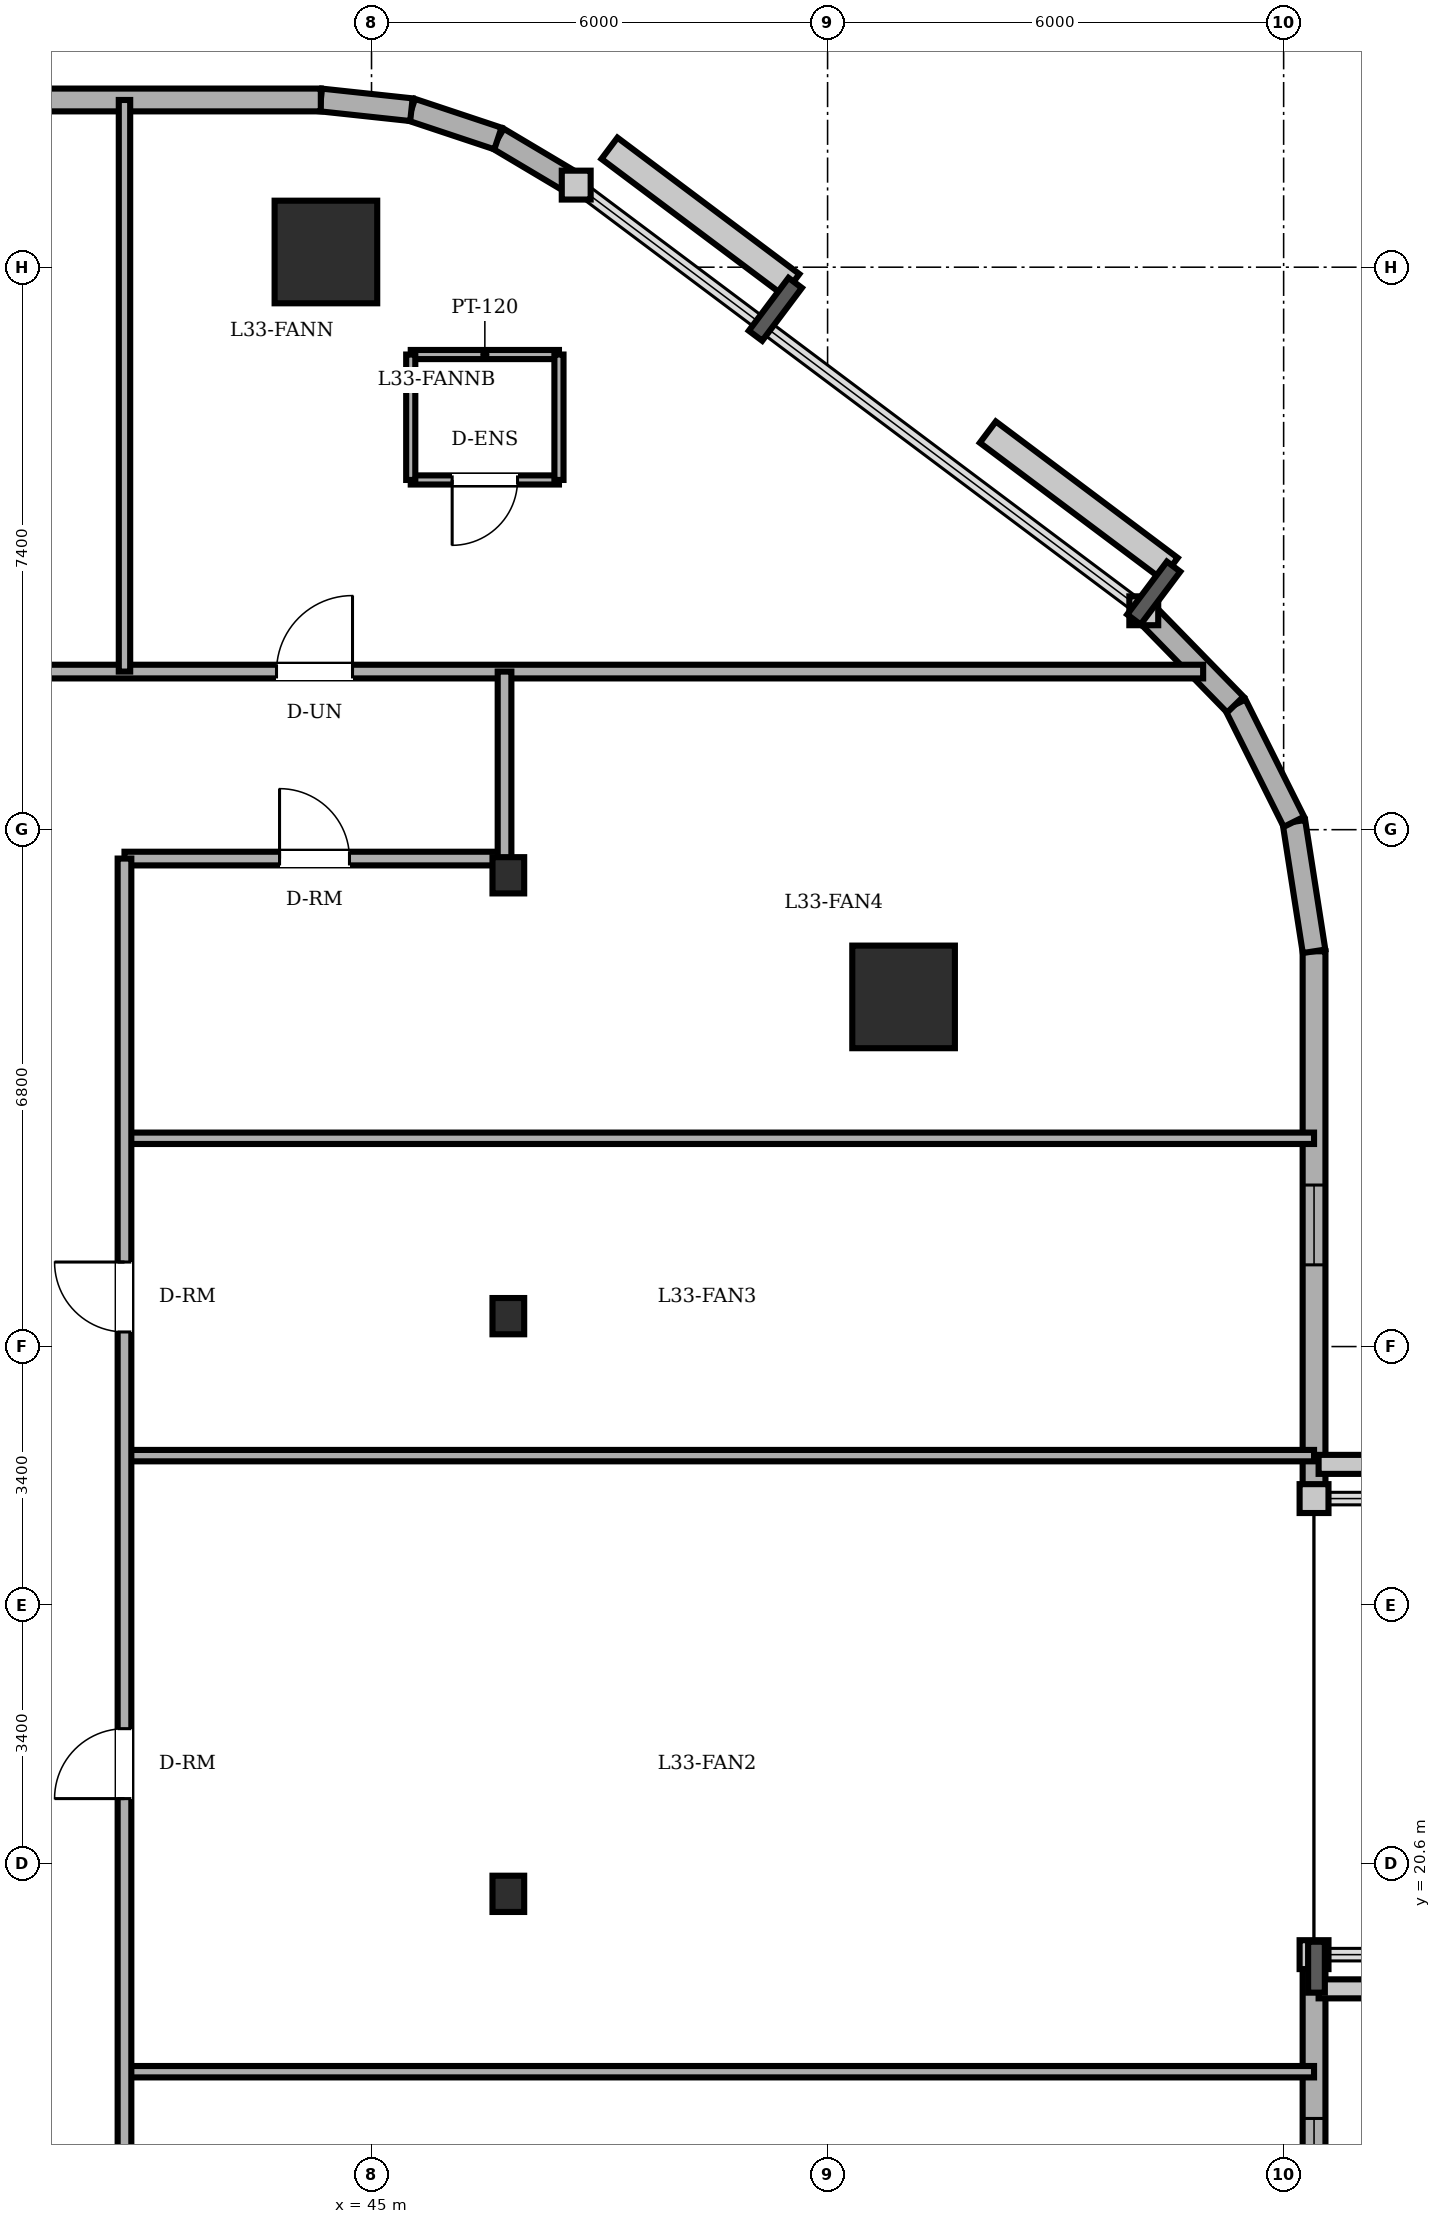
"""IFC4 building model, lengths in metres.
Left out: names, types, materials, properties, quantities, classifications, styles, units other than length and angle.
Written with IfcOpenShell. Run it as: python <this file> out.ifc"""

import sys

from ifc_helpers import new_model, si_unit, direction, frame, frame_2d, origin, origin_2d, place, context, subcontext, project, spatial, rectangle, circle, i_section, extrude, element, fill, save


model = new_model("IFC4")
c1 = context("Model", 3, precision=1e-05, world=origin(), true_north=direction((0.0, 1.0)))
c2 = subcontext(c1, "Body", "Model", "MODEL_VIEW")
j1 = project(units=[si_unit("LENGTHUNIT", "METRE"), si_unit("PLANEANGLEUNIT", "RADIAN")], contexts=[c1])
p1 = place(None, origin())
s1 = spatial("IfcSite", under=j1, at=p1, CompositionType="ELEMENT")
p2 = place(p1, origin())
s2 = spatial("IfcBuilding", under=s1, at=p2, CompositionType="ELEMENT")
p3 = place(p2, frame((0.0, 0.0, 125.9)))
s3 = spatial("IfcBuildingStorey", under=s2, at=p3, CompositionType="ELEMENT", Elevation=125.9)
for number, where, z_axis, x_axis in (
    (1, (52.0, 32.0, 0.0), (0.0, 0.0, 1.0), (1.0, 0.0, 0.0)),
    (2, (44.4, 41.8, 0.0), (0.0, 0.0, 1.0), (1.0, 0.0, 0.0)),
):
    element("IfcColumn", number, at=place(p3, frame(where, z_axis=z_axis, x_axis=x_axis)), inside=s3, PredefinedType="COLUMN", context=c2, shape_type="SweptSolid", body=[
        extrude(circle(Radius=0.675, at=origin_2d()), origin(), (0.0, 0.0, 1.0), 3.6),
    ])
for number, where, z_axis, x_axis in (
    (3, (46.8, 20.2, 0.0), (0.0, 0.0, 1.0), (1.0, 0.0, 0.0)),
    (4, (46.8, 27.8, 0.0), (0.0, 0.0, 1.0), (1.0, 0.0, 0.0)),
    (5, (46.8, 33.6, 0.0), (0.0, 0.0, 1.0), (1.0, 0.0, 0.0)),
):
    element("IfcColumn", number, at=place(p3, frame(where, z_axis=z_axis, x_axis=x_axis)), inside=s3, PredefinedType="COLUMN", context=c2, shape_type="SweptSolid", body=[
        extrude(i_section(OverallWidth=0.417, OverallDepth=0.477, WebThickness=0.036, FlangeThickness=0.057, FilletRadius=0.015, at=origin_2d()), origin(), (0.0, 0.0, 1.0), 3.6),
    ])
p4 = place(p3, frame((57.4, 15.4, 0.0), z_axis=(0.0, 0.0, 1.0), x_axis=(0.0, 1.0, 0.0)))
e6 = element("IfcWall", 6, at=p4, inside=s3, PredefinedType="SOLIDWALL", context=c2, shape_type="SweptSolid", body=[
    extrude(rectangle(XDim=4.0, YDim=0.3, at=frame_2d((2.0, 0.0))), origin(), (0.0, 0.0, 1.0), 3.4),
])
p5 = place(p4, frame((0.795, 0.0, 0.85)))
e7 = element("IfcOpeningElement", 7, at=p5, cuts=e6, PredefinedType="OPENING", context=c2, shape_type="SweptSolid", body=[
    extrude(rectangle(XDim=1.05, YDim=1.55, at=frame_2d((0.525, 0.775))), frame((0.0, 0.16, 0.0), z_axis=(0.0, -1.0, 0.0), x_axis=(1.0, 0.0, 0.0)), (0.0, 0.0, 1.0), 0.32),
])
p6 = place(p3, frame((57.4, 25.4, 0.0), z_axis=(0.0, 0.0, 1.0), x_axis=(0.0, 1.0, 0.0)))
e8 = element("IfcWall", 8, at=p6, inside=s3, PredefinedType="SOLIDWALL", context=c2, shape_type="SweptSolid", body=[
    extrude(rectangle(XDim=7.2, YDim=0.3, at=frame_2d((3.6, 0.0))), origin(), (0.0, 0.0, 1.0), 3.4),
])
p7 = place(p6, frame((3.075, 0.0, 0.85)))
e9 = element("IfcOpeningElement", 9, at=p7, cuts=e8, PredefinedType="OPENING", context=c2, shape_type="SweptSolid", body=[
    extrude(rectangle(XDim=1.05, YDim=1.55, at=frame_2d((0.525, 0.775))), frame((0.0, 0.16, 0.0), z_axis=(0.0, -1.0, 0.0), x_axis=(1.0, 0.0, 0.0)), (0.0, 0.0, 1.0), 0.32),
])
p8 = place(p3, frame((57.4, 32.6, 0.0), z_axis=(0.0, 0.0, 1.0), x_axis=(-0.153620989032, 0.988129845581, 0.0)))
e10 = element("IfcWall", 10, at=p8, inside=s3, PredefinedType="SOLIDWALL", context=c2, shape_type="SweptSolid", body=[
    extrude(rectangle(XDim=1.724, YDim=0.3, at=frame_2d((0.862, 0.0))), origin(), (0.0, 0.0, 1.0), 3.4),
])
for number, where, z_axis, x_axis in (
    (11, (57.135, 34.304, 0.0), (0.0, 0.0, 1.0), (-0.447, 0.894, 0.0)),
    (12, (56.364, 35.846, 0.0), (0.0, 0.0, 1.0), (-0.698, 0.716, 0.0)),
):
    element("IfcWall", number, at=place(p3, frame(where, z_axis=z_axis, x_axis=x_axis)), inside=s3, PredefinedType="SOLIDWALL", context=c2, shape_type="SweptSolid", body=[
        extrude(rectangle(XDim=1.724, YDim=0.3, at=frame_2d((0.862, 0.0))), origin(), (0.0, 0.0, 1.0), 3.4),
    ])
p9 = place(p3, frame((47.693, 42.68, 0.0), z_axis=(0.0, 0.0, 1.0), x_axis=(-0.859320591642, 0.511437308749, 0.0)))
e13 = element("IfcWall", 13, at=p9, inside=s3, PredefinedType="SOLIDWALL", context=c2, shape_type="SweptSolid", body=[
    extrude(rectangle(XDim=1.199, YDim=0.3, at=frame_2d((0.599, 0.0))), origin(), (0.0, 0.0, 1.0), 3.4),
])
p10 = place(p3, frame((46.663, 43.293, 0.0), z_axis=(0.0, 0.0, 1.0), x_axis=(-0.948744332129, 0.316044604847, 0.0)))
e14 = element("IfcWall", 14, at=p10, inside=s3, PredefinedType="SOLIDWALL", context=c2, shape_type="SweptSolid", body=[
    extrude(rectangle(XDim=1.2, YDim=0.3, at=frame_2d((0.6, 0.0))), origin(), (0.0, 0.0, 1.0), 3.4),
])
p11 = place(p3, frame((45.525, 43.672, 0.0), z_axis=(0.0, 0.0, 1.0), x_axis=(-0.994289103787, 0.106720092254, 0.0)))
e15 = element("IfcWall", 15, at=p11, inside=s3, PredefinedType="SOLIDWALL", context=c2, shape_type="SweptSolid", body=[
    extrude(rectangle(XDim=1.199, YDim=0.3, at=frame_2d((0.599, 0.0))), origin(), (0.0, 0.0, 1.0), 3.4),
])
p12 = place(p3, frame((44.333, 43.8, 0.0), z_axis=(0.0, 0.0, 1.0), x_axis=(-1.0, 0.0, 0.0)))
e16 = element("IfcWall", 16, at=p12, inside=s3, PredefinedType="SOLIDWALL", context=c2, shape_type="SweptSolid", body=[
    extrude(rectangle(XDim=29.933, YDim=0.3, at=frame_2d((14.967, 0.0))), origin(), (0.0, 0.0, 1.0), 3.4),
])
p13 = place(p12, frame((17.683, 0.0, 0.0)))
e17 = element("IfcOpeningElement", 17, at=p13, cuts=e16, PredefinedType="OPENING", context=c2, shape_type="SweptSolid", body=[
    extrude(rectangle(XDim=0.95, YDim=2.2, at=frame_2d((0.475, 1.1))), frame((0.0, 0.16, 0.0), z_axis=(0.0, -1.0, 0.0), x_axis=(1.0, 0.0, 0.0)), (0.0, 0.0, 1.0), 0.32),
])
p14 = place(p12, frame((5.075, 0.0, 0.85)))
e18 = element("IfcOpeningElement", 18, at=p14, cuts=e16, PredefinedType="OPENING", context=c2, shape_type="SweptSolid", body=[
    extrude(rectangle(XDim=1.65, YDim=1.55, at=frame_2d((0.825, 0.775))), frame((0.0, 0.16, 0.0), z_axis=(0.0, -1.0, 0.0), x_axis=(1.0, 0.0, 0.0)), (0.0, 0.0, 1.0), 0.32),
])
p15 = place(p12, frame((8.391, 0.0, 0.85)))
e19 = element("IfcOpeningElement", 19, at=p15, cuts=e16, PredefinedType="OPENING", context=c2, shape_type="SweptSolid", body=[
    extrude(rectangle(XDim=1.65, YDim=1.55, at=frame_2d((0.825, 0.775))), frame((0.0, 0.16, 0.0), z_axis=(0.0, -1.0, 0.0), x_axis=(1.0, 0.0, 0.0)), (0.0, 0.0, 1.0), 0.32),
])
p16 = place(p12, frame((14.108, 0.0, 0.85)))
e20 = element("IfcOpeningElement", 20, at=p16, cuts=e16, PredefinedType="OPENING", context=c2, shape_type="SweptSolid", body=[
    extrude(rectangle(XDim=1.65, YDim=1.55, at=frame_2d((0.825, 0.775))), frame((0.0, 0.16, 0.0), z_axis=(0.0, -1.0, 0.0), x_axis=(1.0, 0.0, 0.0)), (0.0, 0.0, 1.0), 0.32),
])
p17 = place(p12, frame((22.191, 0.0, 0.85)))
e21 = element("IfcOpeningElement", 21, at=p17, cuts=e16, PredefinedType="OPENING", context=c2, shape_type="SweptSolid", body=[
    extrude(rectangle(XDim=1.65, YDim=1.55, at=frame_2d((0.825, 0.775))), frame((0.0, 0.16, 0.0), z_axis=(0.0, -1.0, 0.0), x_axis=(1.0, 0.0, 0.0)), (0.0, 0.0, 1.0), 0.32),
])
p18 = place(p12, frame((25.475, 0.0, 0.85)))
e22 = element("IfcOpeningElement", 22, at=p18, cuts=e16, PredefinedType="OPENING", context=c2, shape_type="SweptSolid", body=[
    extrude(rectangle(XDim=1.65, YDim=1.55, at=frame_2d((0.825, 0.775))), frame((0.0, 0.16, 0.0), z_axis=(0.0, -1.0, 0.0), x_axis=(1.0, 0.0, 0.0)), (0.0, 0.0, 1.0), 0.32),
])
p19 = place(p3, frame((45.516, 40.451, 0.0), z_axis=(0.0, 0.0, 1.0), x_axis=(1.0, 0.0, 0.0)))
e23 = element("IfcWall", 23, at=p19, inside=s3, PredefinedType="PARTITIONING", context=c2, shape_type="SweptSolid", body=[
    extrude(rectangle(XDim=1.95, YDim=0.12, at=frame_2d((0.975, 0.0))), origin(), (0.0, 0.0, 1.0), 3.4),
])
p20 = place(p3, frame((47.466, 38.801, 0.0), z_axis=(0.0, 0.0, 1.0), x_axis=(-1.0, 0.0, 0.0)))
e24 = element("IfcWall", 24, at=p20, inside=s3, PredefinedType="PARTITIONING", context=c2, shape_type="SweptSolid", body=[
    extrude(rectangle(XDim=1.95, YDim=0.12, at=frame_2d((0.975, 0.0))), origin(), (0.0, 0.0, 1.0), 3.4),
])
p21 = place(p20, frame((0.545, 0.0, 0.0)))
e25 = element("IfcOpeningElement", 25, at=p21, cuts=e24, PredefinedType="OPENING", context=c2, shape_type="SweptSolid", body=[
    extrude(rectangle(XDim=0.86, YDim=2.1, at=frame_2d((0.43, 1.05))), frame((0.0, 0.07, 0.0), z_axis=(0.0, -1.0, 0.0), x_axis=(1.0, 0.0, 0.0)), (0.0, 0.0, 1.0), 0.14),
])
for number, where, z_axis, x_axis in (
    (26, (45.516, 40.451, 0.0), (0.0, 0.0, 1.0), (0.0, -1.0, 0.0)),
    (27, (47.466, 38.801, 0.0), (0.0, 0.0, 1.0), (0.0, 1.0, 0.0)),
):
    element("IfcWall", number, at=place(p3, frame(where, z_axis=z_axis, x_axis=x_axis)), inside=s3, PredefinedType="PARTITIONING", context=c2, shape_type="SweptSolid", body=[
        extrude(rectangle(XDim=1.65, YDim=0.12, at=frame_2d((0.825, 0.0))), origin(), (0.0, 0.0, 1.0), 3.4),
    ])
p22 = place(p3, frame((41.75, 17.86, 0.0), z_axis=(0.0, 0.0, 1.0), x_axis=(1.0, 0.0, 0.0)))
e28 = element("IfcWall", 28, at=p22, inside=s3, PredefinedType="PARTITIONING", context=c2, shape_type="SweptSolid", body=[
    extrude(rectangle(XDim=15.65, YDim=0.15, at=frame_2d((7.825, 0.0))), origin(), (0.0, 0.0, 1.0), 3.4),
])
p23 = place(p3, frame((41.75, 25.965, 0.0), z_axis=(0.0, 0.0, 1.0), x_axis=(1.0, 0.0, 0.0)))
e29 = element("IfcWall", 29, at=p23, inside=s3, PredefinedType="PARTITIONING", context=c2, shape_type="SweptSolid", body=[
    extrude(rectangle(XDim=15.65, YDim=0.15, at=frame_2d((7.825, 0.0))), origin(), (0.0, 0.0, 1.0), 3.052),
])
p24 = place(p3, frame((41.75, 30.14, 0.0), z_axis=(0.0, 0.0, 1.0), x_axis=(1.0, 0.0, 0.0)))
e30 = element("IfcWall", 30, at=p24, inside=s3, PredefinedType="PARTITIONING", context=c2, shape_type="SweptSolid", body=[
    extrude(rectangle(XDim=15.65, YDim=0.15, at=frame_2d((7.825, 0.0))), origin(), (0.0, 0.0, 1.0), 3.4),
])
p25 = place(p3, frame((41.75, 33.82, 0.0), z_axis=(0.0, 0.0, 1.0), x_axis=(1.0, 0.0, 0.0)))
e31 = element("IfcWall", 31, at=p25, inside=s3, PredefinedType="PARTITIONING", context=c2, shape_type="SweptSolid", body=[
    extrude(rectangle(XDim=5.0, YDim=0.18, at=frame_2d((2.5, 0.0))), origin(), (0.0, 0.0, 1.0), 2.882),
])
p26 = place(p25, frame((2.04, 0.0, 0.0)))
e32 = element("IfcOpeningElement", 32, at=p26, cuts=e31, PredefinedType="OPENING", context=c2, shape_type="SweptSolid", body=[
    extrude(rectangle(XDim=0.92, YDim=2.1, at=frame_2d((0.46, 1.05))), frame((0.0, 0.1, 0.0), z_axis=(0.0, -1.0, 0.0), x_axis=(1.0, 0.0, 0.0)), (0.0, 0.0, 1.0), 0.2),
])
p27 = place(p3, frame((8.8, 36.28, 0.0), z_axis=(0.0, 0.0, 1.0), x_axis=(1.0, 0.0, 0.0)))
e33 = element("IfcWall", 33, at=p27, inside=s3, PredefinedType="PARTITIONING", context=c2, shape_type="SweptSolid", body=[
    extrude(rectangle(XDim=47.141, YDim=0.18, at=frame_2d((23.57, 0.0))), origin(), (0.0, 0.0, 1.0), 3.4),
])
p28 = place(p27, frame((17.05, 0.0, 0.0)))
e34 = element("IfcOpeningElement", 34, at=p28, cuts=e33, PredefinedType="OPENING", context=c2, shape_type="SweptSolid", body=[
    extrude(rectangle(XDim=0.9, YDim=2.1, at=frame_2d((0.45, 1.05))), frame((0.0, 0.1, 0.0), z_axis=(0.0, -1.0, 0.0), x_axis=(1.0, 0.0, 0.0)), (0.0, 0.0, 1.0), 0.2),
])
p29 = place(p27, frame((20.67, 0.0, 0.0)))
e35 = element("IfcOpeningElement", 35, at=p29, cuts=e33, PredefinedType="OPENING", context=c2, shape_type="SweptSolid", body=[
    extrude(rectangle(XDim=0.86, YDim=2.1, at=frame_2d((0.43, 1.05))), frame((0.0, 0.1, 0.0), z_axis=(0.0, -1.0, 0.0), x_axis=(1.0, 0.0, 0.0)), (0.0, 0.0, 1.0), 0.2),
])
p30 = place(p27, frame((34.95, 0.0, 0.0)))
e36 = element("IfcOpeningElement", 36, at=p30, cuts=e33, PredefinedType="OPENING", context=c2, shape_type="SweptSolid", body=[
    extrude(rectangle(XDim=1.0, YDim=2.15, at=frame_2d((0.5, 1.075))), frame((0.0, 0.1, 0.0), z_axis=(0.0, -1.0, 0.0), x_axis=(1.0, 0.0, 0.0)), (0.0, 0.0, 1.0), 0.2),
])
p31 = place(p27, frame((8.0, 0.0, 0.0)))
e37 = element("IfcOpeningElement", 37, at=p31, cuts=e33, PredefinedType="OPENING", context=c2, shape_type="SweptSolid", body=[
    extrude(rectangle(XDim=1.0, YDim=2.15, at=frame_2d((0.5, 1.075))), frame((0.0, 0.1, 0.0), z_axis=(0.0, -1.0, 0.0), x_axis=(1.0, 0.0, 0.0)), (0.0, 0.0, 1.0), 0.2),
])
p32 = place(p27, frame((27.515, 0.0, 0.0)))
e38 = element("IfcOpeningElement", 38, at=p32, cuts=e33, PredefinedType="OPENING", context=c2, shape_type="SweptSolid", body=[
    extrude(rectangle(XDim=0.92, YDim=2.1, at=frame_2d((0.46, 1.05))), frame((0.0, 0.1, 0.0), z_axis=(0.0, -1.0, 0.0), x_axis=(1.0, 0.0, 0.0)), (0.0, 0.0, 1.0), 0.2),
])
p33 = place(p3, frame((41.75, 14.18, 0.0), z_axis=(0.0, 0.0, 1.0), x_axis=(0.0, 1.0, 0.0)))
e39 = element("IfcWall", 39, at=p33, inside=s3, PredefinedType="PARTITIONING", context=c2, shape_type="SweptSolid", body=[
    extrude(rectangle(XDim=19.64, YDim=0.18, at=frame_2d((9.82, 0.0))), origin(), (0.0, 0.0, 1.0), 3.4),
])
p34 = place(p33, frame((7.273, 0.0, 0.0)))
e40 = element("IfcOpeningElement", 40, at=p34, cuts=e39, PredefinedType="OPENING", context=c2, shape_type="SweptSolid", body=[
    extrude(rectangle(XDim=0.92, YDim=2.1, at=frame_2d((0.46, 1.05))), frame((0.0, 0.1, 0.0), z_axis=(0.0, -1.0, 0.0), x_axis=(1.0, 0.0, 0.0)), (0.0, 0.0, 1.0), 0.2),
])
p35 = place(p33, frame((13.412, 0.0, 0.0)))
e41 = element("IfcOpeningElement", 41, at=p35, cuts=e39, PredefinedType="OPENING", context=c2, shape_type="SweptSolid", body=[
    extrude(rectangle(XDim=0.92, YDim=2.1, at=frame_2d((0.46, 1.05))), frame((0.0, 0.1, 0.0), z_axis=(0.0, -1.0, 0.0), x_axis=(1.0, 0.0, 0.0)), (0.0, 0.0, 1.0), 0.2),
])
p36 = place(p3, frame((41.75, 36.28, 0.0), z_axis=(0.0, 0.0, 1.0), x_axis=(0.0, 1.0, 0.0)))
e42 = element("IfcWall", 42, at=p36, inside=s3, PredefinedType="PARTITIONING", context=c2, shape_type="SweptSolid", body=[
    extrude(rectangle(XDim=7.52, YDim=0.15, at=frame_2d((3.76, 0.0))), origin(), (0.0, 0.0, 1.0), 3.4),
])
p37 = place(p3, frame((46.75, 33.82, 0.0), z_axis=(0.0, 0.0, 1.0), x_axis=(0.0, 1.0, 0.0)))
e43 = element("IfcWall", 43, at=p37, inside=s3, PredefinedType="PARTITIONING", context=c2, shape_type="SweptSolid", body=[
    extrude(rectangle(XDim=2.46, YDim=0.18, at=frame_2d((1.23, 0.0))), origin(), (0.0, 0.0, 1.0), 2.882),
])
p38 = place(p5, origin())
e44 = element("IfcWindow", 44, at=p38, inside=s3, PartitioningType="SINGLE_PANEL", PredefinedType="WINDOW", context=c2, shape_type="SweptSolid", body=[
    extrude(rectangle(XDim=1.05, YDim=1.55, at=frame_2d((0.525, 0.775))), frame((0.0, 0.03, 0.0), z_axis=(0.0, -1.0, 0.0), x_axis=(1.0, 0.0, 0.0)), (0.0, 0.0, 1.0), 0.06),
])
fill(e7, e44)
p39 = place(p7, origin())
e45 = element("IfcWindow", 45, at=p39, inside=s3, PartitioningType="SINGLE_PANEL", PredefinedType="WINDOW", context=c2, shape_type="SweptSolid", body=[
    extrude(rectangle(XDim=1.05, YDim=1.55, at=frame_2d((0.525, 0.775))), frame((0.0, 0.03, 0.0), z_axis=(0.0, -1.0, 0.0), x_axis=(1.0, 0.0, 0.0)), (0.0, 0.0, 1.0), 0.06),
])
fill(e9, e45)
p40 = place(p21, origin())
e46 = element("IfcDoor", 46, at=p40, inside=s3, OperationType="SINGLE_SWING_RIGHT", PredefinedType="DOOR", context=c2, shape_type="SweptSolid", body=[
    extrude(rectangle(XDim=0.86, YDim=2.1, at=frame_2d((0.43, 1.05))), frame((0.0, 0.025, 0.0), z_axis=(0.0, -1.0, 0.0), x_axis=(1.0, 0.0, 0.0)), (0.0, 0.0, 1.0), 0.05),
])
fill(e25, e46)
p41 = place(p34, origin())
e47 = element("IfcDoor", 47, at=p41, inside=s3, OperationType="SINGLE_SWING_LEFT", PredefinedType="DOOR", context=c2, shape_type="SweptSolid", body=[
    extrude(rectangle(XDim=0.92, YDim=2.1, at=frame_2d((0.46, 1.05))), frame((0.0, 0.025, 0.0), z_axis=(0.0, -1.0, 0.0), x_axis=(1.0, 0.0, 0.0)), (0.0, 0.0, 1.0), 0.05),
])
fill(e40, e47)
p42 = place(p35, origin())
e48 = element("IfcDoor", 48, at=p42, inside=s3, OperationType="SINGLE_SWING_RIGHT", PredefinedType="DOOR", context=c2, shape_type="SweptSolid", body=[
    extrude(rectangle(XDim=0.92, YDim=2.1, at=frame_2d((0.46, 1.05))), frame((0.0, 0.025, 0.0), z_axis=(0.0, -1.0, 0.0), x_axis=(1.0, 0.0, 0.0)), (0.0, 0.0, 1.0), 0.05),
])
fill(e41, e48)
p43 = place(p26, origin())
e49 = element("IfcDoor", 49, at=p43, inside=s3, OperationType="SINGLE_SWING_LEFT", PredefinedType="DOOR", context=c2, shape_type="SweptSolid", body=[
    extrude(rectangle(XDim=0.92, YDim=2.1, at=frame_2d((0.46, 1.05))), frame((0.0, 0.025, 0.0), z_axis=(0.0, -1.0, 0.0), x_axis=(1.0, 0.0, 0.0)), (0.0, 0.0, 1.0), 0.05),
])
fill(e32, e49)
p44 = place(p30, origin())
e50 = element("IfcDoor", 50, at=p44, inside=s3, OperationType="SINGLE_SWING_RIGHT", PredefinedType="DOOR", context=c2, shape_type="SweptSolid", body=[
    extrude(rectangle(XDim=1.0, YDim=2.15, at=frame_2d((0.5, 1.075))), frame((0.0, 0.025, 0.0), z_axis=(0.0, -1.0, 0.0), x_axis=(1.0, 0.0, 0.0)), (0.0, 0.0, 1.0), 0.05),
])
fill(e36, e50)
save(model, sys.argv[1])
